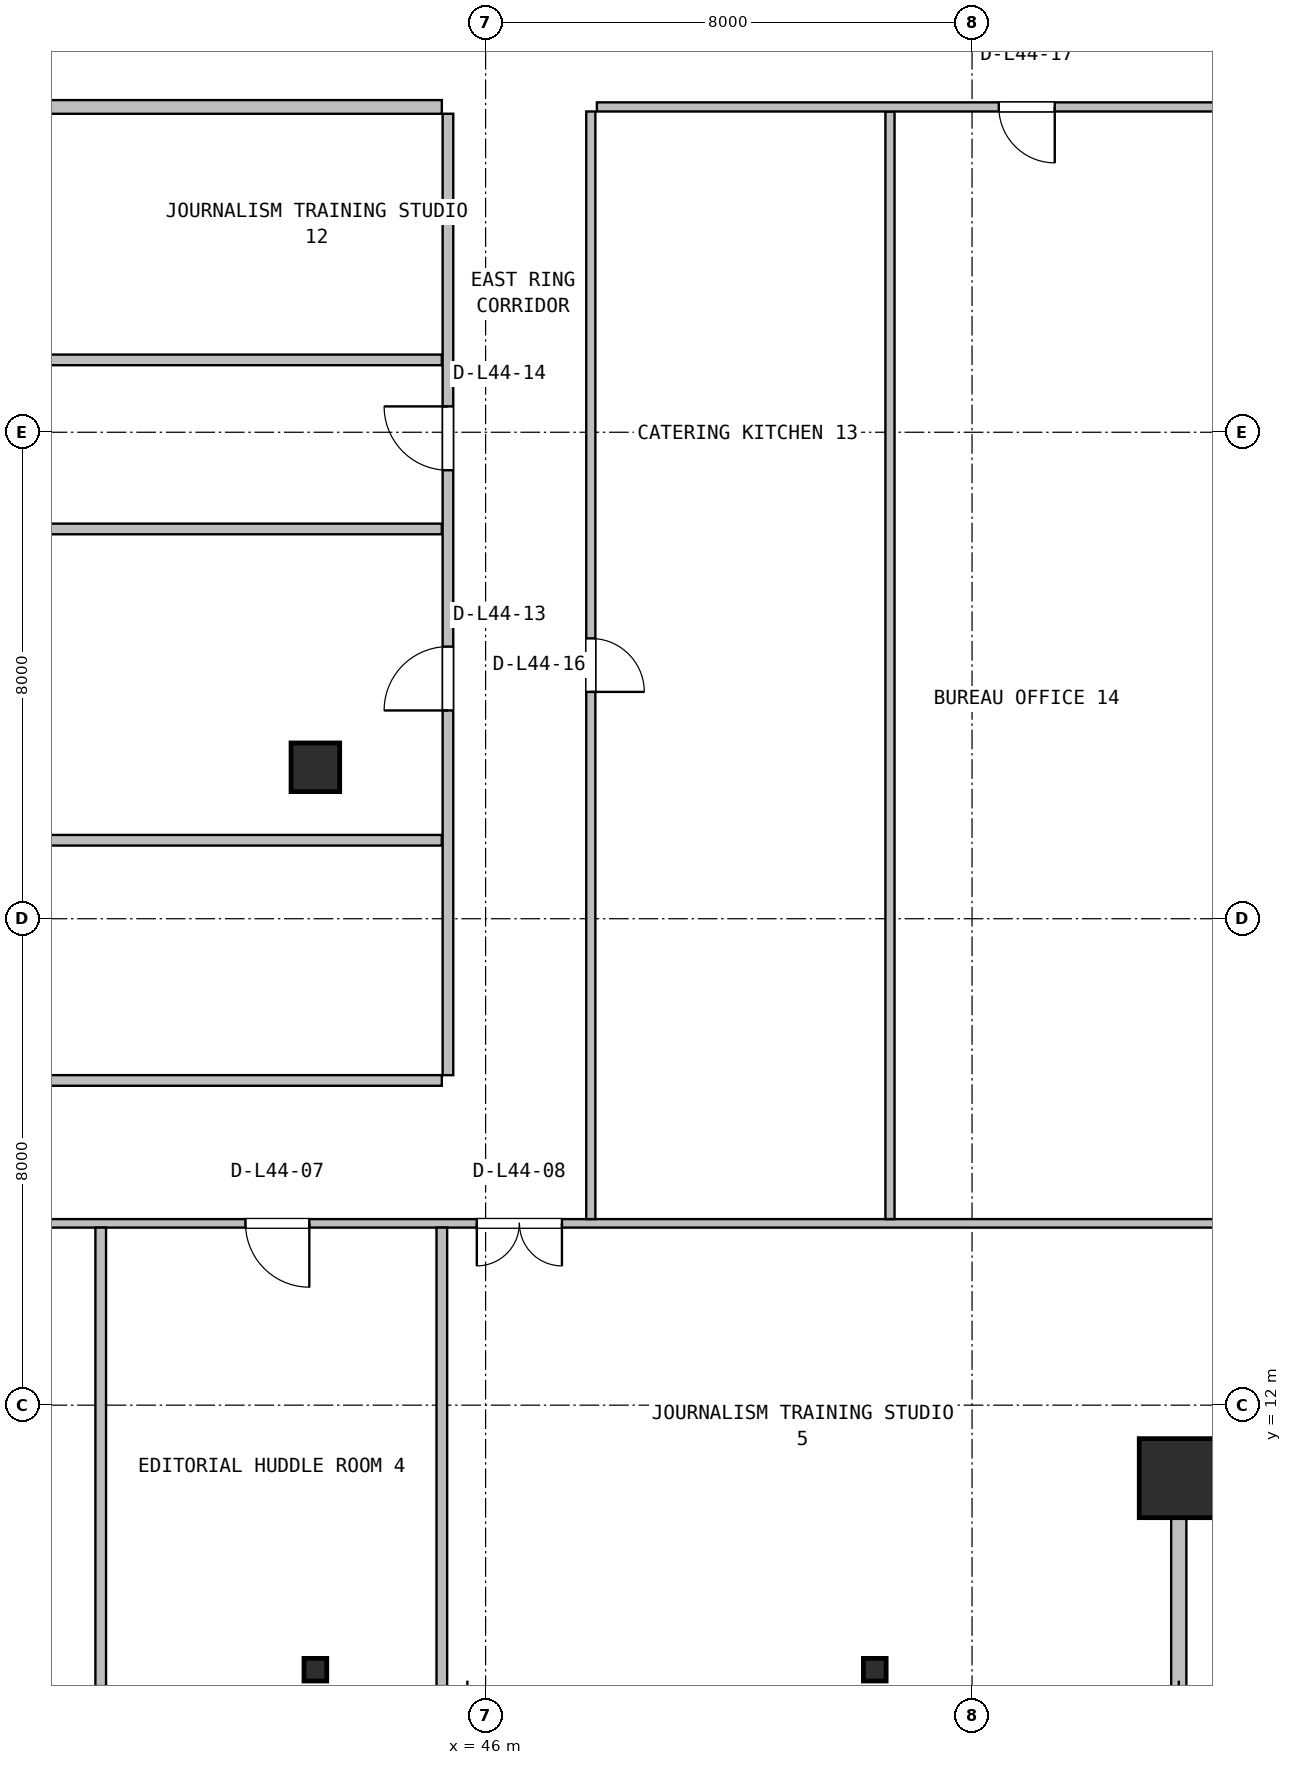
"""IFC4 building model, lengths in metres.
Left out: names, types, materials, properties, quantities, classifications, styles, units other than length and angle.
Written with IfcOpenShell. Run it as: python <this file> out.ifc"""

import sys

from ifc_helpers import new_model, si_unit, direction, frame, frame_2d, origin, origin_2d, place, context, subcontext, project, spatial, rectangle, hollow_rectangle, i_section, extrude, source, transform, mapped, element, fill, save


model = new_model("IFC4")
c1 = context("Model", 3, precision=1e-05, world=origin(), true_north=direction((0.0, 1.0)))
c2 = subcontext(c1, "Body", "Model", "MODEL_VIEW")
j1 = project(units=[si_unit("LENGTHUNIT", "METRE"), si_unit("PLANEANGLEUNIT", "RADIAN")], contexts=[c1])
p1 = place(None, origin())
s1 = spatial("IfcSite", under=j1, at=p1, CompositionType="ELEMENT")
p2 = place(p1, origin())
s2 = spatial("IfcBuilding", under=s1, at=p2, CompositionType="ELEMENT")
p3 = place(p2, frame((0.0, 0.0, 180.0)))
s3 = spatial("IfcBuildingStorey", under=s2, at=p3, CompositionType="ELEMENT", Elevation=180.0)
m1 = source(origin(), c2, "Body", "SweptSolid", [
    extrude(hollow_rectangle(XDim=1.3, YDim=1.3, WallThickness=0.05, at=origin_2d()), origin(), (0.0, 0.0, 1.0), 3.8),
])
p4 = place(p3, frame((57.4, 10.8, 0.0), z_axis=(0.0, 0.0, 1.0), x_axis=(1.0, 0.0, 0.0)))
e1 = element("IfcColumn", 1, at=p4, inside=s3, PredefinedType="COLUMN", context=c2, shape_type="MappedRepresentation", body=[
    mapped(m1, transform((0.0, 0.0, 0.0), x_axis=(1.0, 0.0, 0.0), y_axis=(0.0, 1.0, 0.0), z_axis=(0.0, 0.0, 1.0), scale=1.0)),
])
m2 = source(origin(), c2, "Body", "SweptSolid", [
    extrude(i_section(OverallWidth=0.374, OverallDepth=0.372, WebThickness=0.016, FlangeThickness=0.026, FilletRadius=0.016, at=origin_2d()), origin(), (0.0, 0.0, 1.0), 3.8),
])
for number, where, z_axis, x_axis in (
    (2, (43.2, 7.65, 0.0), (0.0, 0.0, 1.0), (1.0, 0.0, 0.0)),
    (3, (52.4, 7.65, 0.0), (0.0, 0.0, 1.0), (1.0, 0.0, 0.0)),
):
    element("IfcColumn", number, at=place(p3, frame(where, z_axis=z_axis, x_axis=x_axis)), inside=s3, PredefinedType="COLUMN", context=c2, shape_type="MappedRepresentation", body=[
        mapped(m2, transform((0.0, 0.0, 0.0), x_axis=(1.0, 0.0, 0.0), y_axis=(0.0, 1.0, 0.0), z_axis=(0.0, 0.0, 1.0), scale=1.0)),
    ])
m3 = source(origin(), c2, "Body", "SweptSolid", [
    extrude(rectangle(XDim=0.8, YDim=0.8, at=origin_2d()), origin(), (0.0, 0.0, 1.0), 3.8),
])
p5 = place(p3, frame((43.2, 22.49, 0.0), z_axis=(0.0, 0.0, 1.0), x_axis=(1.0, 0.0, 0.0)))
e4 = element("IfcColumn", 4, at=p5, inside=s3, PredefinedType="COLUMN", context=c2, shape_type="MappedRepresentation", body=[
    mapped(m3, transform((0.0, 0.0, 0.0), x_axis=(1.0, 0.0, 0.0), y_axis=(0.0, 1.0, 0.0), z_axis=(0.0, 0.0, 1.0), scale=1.0)),
])
p6 = place(p3, frame((57.4, 7.28, 0.0), z_axis=(0.0, 0.0, 1.0), x_axis=(0.0, 1.0, 0.0)))
e5 = element("IfcWall", 5, at=p6, inside=s3, PredefinedType="SOLIDWALL", context=c2, shape_type="SweptSolid", body=[
    extrude(rectangle(XDim=3.6, YDim=0.25, at=frame_2d((1.8, 0.0))), origin(), (0.0, 0.0, 1.0), 3.108),
])
p7 = place(p3, frame((7.18, 14.99, 0.0), z_axis=(0.0, 0.0, 1.0), x_axis=(1.0, 0.0, 0.0)))
e6 = element("IfcWall", 6, at=p7, inside=s3, PredefinedType="PARTITIONING", context=c2, shape_type="SweptSolid", body=[
    extrude(rectangle(XDim=53.64, YDim=0.14, at=frame_2d((26.82, 0.0))), origin(), (0.0, 0.0, 1.0), 2.909),
])
p8 = place(p7, frame((13.505, 0.0, 0.0)))
e7 = element("IfcOpeningElement", 7, at=p8, cuts=e6, PredefinedType="OPENING", context=c2, shape_type="SweptSolid", body=[
    extrude(rectangle(XDim=1.0, YDim=2.1, at=frame_2d((0.5, 1.05))), frame((0.0, 0.08, 0.0), z_axis=(0.0, -1.0, 0.0), x_axis=(1.0, 0.0, 0.0)), (0.0, 0.0, 1.0), 0.16),
])
p9 = place(p7, frame((18.51, 0.0, 0.0)))
e8 = element("IfcOpeningElement", 8, at=p9, cuts=e6, PredefinedType="OPENING", context=c2, shape_type="SweptSolid", body=[
    extrude(rectangle(XDim=1.05, YDim=2.1, at=frame_2d((0.525, 1.05))), frame((0.0, 0.08, 0.0), z_axis=(0.0, -1.0, 0.0), x_axis=(1.0, 0.0, 0.0)), (0.0, 0.0, 1.0), 0.16),
])
p10 = place(p7, frame((27.215, 0.0, 0.0)))
e9 = element("IfcOpeningElement", 9, at=p10, cuts=e6, PredefinedType="OPENING", context=c2, shape_type="SweptSolid", body=[
    extrude(rectangle(XDim=1.05, YDim=2.1, at=frame_2d((0.525, 1.05))), frame((0.0, 0.08, 0.0), z_axis=(0.0, -1.0, 0.0), x_axis=(1.0, 0.0, 0.0)), (0.0, 0.0, 1.0), 0.16),
])
p11 = place(p7, frame((34.87, 0.0, 0.0)))
e10 = element("IfcOpeningElement", 10, at=p11, cuts=e6, PredefinedType="OPENING", context=c2, shape_type="SweptSolid", body=[
    extrude(rectangle(XDim=1.05, YDim=2.1, at=frame_2d((0.525, 1.05))), frame((0.0, 0.08, 0.0), z_axis=(0.0, -1.0, 0.0), x_axis=(1.0, 0.0, 0.0)), (0.0, 0.0, 1.0), 0.16),
])
p12 = place(p7, frame((38.675, 0.0, 0.0)))
e11 = element("IfcOpeningElement", 11, at=p12, cuts=e6, PredefinedType="OPENING", context=c2, shape_type="SweptSolid", body=[
    extrude(rectangle(XDim=1.4, YDim=2.12, at=frame_2d((0.7, 1.06))), frame((0.0, 0.08, 0.0), z_axis=(0.0, -1.0, 0.0), x_axis=(1.0, 0.0, 0.0)), (0.0, 0.0, 1.0), 0.16),
])
for number, where, z_axis, x_axis in (
    (12, (39.67, 7.38, 0.0), (0.0, 0.0, 1.0), (0.0, 1.0, 0.0)),
    (13, (45.28, 7.38, 0.0), (0.0, 0.0, 1.0), (0.0, 1.0, 0.0)),
):
    element("IfcWall", number, at=place(p3, frame(where, z_axis=z_axis, x_axis=x_axis)), inside=s3, PredefinedType="PARTITIONING", context=c2, shape_type="SweptSolid", body=[
        extrude(rectangle(XDim=7.54, YDim=0.175, at=frame_2d((3.77, 0.0))), origin(), (0.0, 0.0, 1.0), 3.108),
    ])
p13 = place(p3, frame((22.46, 17.34, 0.0), z_axis=(0.0, 0.0, 1.0), x_axis=(1.0, 0.0, 0.0)))
e14 = element("IfcWall", 14, at=p13, inside=s3, PredefinedType="PARTITIONING", context=c2, shape_type="SweptSolid", body=[
    extrude(rectangle(XDim=22.82, YDim=0.175, at=frame_2d((11.41, 0.0))), origin(), (0.0, 0.0, 1.0), 2.909),
])
p14 = place(p13, frame((10.885, 0.0, 0.0)))
e15 = element("IfcOpeningElement", 15, at=p14, cuts=e14, PredefinedType="OPENING", context=c2, shape_type="SweptSolid", body=[
    extrude(rectangle(XDim=1.05, YDim=2.1, at=frame_2d((0.525, 1.05))), frame((0.0, 0.098, 0.0), z_axis=(0.0, -1.0, 0.0), x_axis=(1.0, 0.0, 0.0)), (0.0, 0.0, 1.0), 0.195),
])
p15 = place(p3, frame((45.38, 17.427, 0.0), z_axis=(0.0, 0.0, 1.0), x_axis=(0.0, 1.0, 0.0)))
e16 = element("IfcWall", 16, at=p15, inside=s3, PredefinedType="PARTITIONING", context=c2, shape_type="SweptSolid", body=[
    extrude(rectangle(XDim=15.811, YDim=0.175, at=frame_2d((7.906, 0.0))), origin(), (0.0, 0.0, 1.0), 3.222),
])
p16 = place(p15, frame((5.998, 0.0, 0.0)))
e17 = element("IfcOpeningElement", 17, at=p16, cuts=e16, PredefinedType="OPENING", context=c2, shape_type="SweptSolid", body=[
    extrude(rectangle(XDim=1.05, YDim=2.1, at=frame_2d((0.525, 1.05))), frame((0.0, 0.098, 0.0), z_axis=(0.0, -1.0, 0.0), x_axis=(1.0, 0.0, 0.0)), (0.0, 0.0, 1.0), 0.195),
])
p17 = place(p15, frame((9.948, 0.0, 0.0)))
e18 = element("IfcOpeningElement", 18, at=p17, cuts=e16, PredefinedType="OPENING", context=c2, shape_type="SweptSolid", body=[
    extrude(rectangle(XDim=1.05, YDim=2.1, at=frame_2d((0.525, 1.05))), frame((0.0, 0.098, 0.0), z_axis=(0.0, -1.0, 0.0), x_axis=(1.0, 0.0, 0.0)), (0.0, 0.0, 1.0), 0.195),
])
for number, where, z_axis, x_axis in (
    (19, (22.46, 21.29, 0.0), (0.0, 0.0, 1.0), (1.0, 0.0, 0.0)),
    (20, (22.46, 26.41, 0.0), (0.0, 0.0, 1.0), (1.0, 0.0, 0.0)),
    (21, (22.46, 29.19, 0.0), (0.0, 0.0, 1.0), (1.0, 0.0, 0.0)),
):
    element("IfcWall", number, at=place(p3, frame(where, z_axis=z_axis, x_axis=x_axis)), inside=s3, PredefinedType="PARTITIONING", context=c2, shape_type="SweptSolid", body=[
        extrude(rectangle(XDim=22.82, YDim=0.175, at=frame_2d((11.41, 0.0))), origin(), (0.0, 0.0, 1.0), 2.909),
    ])
p18 = place(p3, frame((22.46, 33.35, 0.0), z_axis=(0.0, 0.0, 1.0), x_axis=(1.0, 0.0, 0.0)))
e22 = element("IfcWall", 22, at=p18, inside=s3, PredefinedType="PARTITIONING", context=c2, shape_type="SweptSolid", body=[
    extrude(rectangle(XDim=22.82, YDim=0.225, at=frame_2d((11.41, 0.0))), origin(), (0.0, 0.0, 1.0), 2.909),
])
p19 = place(p18, frame((10.71, 0.0, 0.0)))
e23 = element("IfcOpeningElement", 23, at=p19, cuts=e22, PredefinedType="OPENING", context=c2, shape_type="SweptSolid", body=[
    extrude(rectangle(XDim=1.4, YDim=2.12, at=frame_2d((0.7, 1.06))), frame((0.0, 0.123, 0.0), z_axis=(0.0, -1.0, 0.0), x_axis=(1.0, 0.0, 0.0)), (0.0, 0.0, 1.0), 0.245),
])
p20 = place(p3, frame((52.65, 15.06, 0.0), z_axis=(0.0, 0.0, 1.0), x_axis=(0.0, 1.0, 0.0)))
e24 = element("IfcWall", 24, at=p20, inside=s3, PredefinedType="PARTITIONING", context=c2, shape_type="SweptSolid", body=[
    extrude(rectangle(XDim=18.215, YDim=0.15, at=frame_2d((9.107, 0.0))), origin(), (0.0, 0.0, 1.0), 3.222),
])
p21 = place(p3, frame((47.83, 33.35, 0.0), z_axis=(0.0, 0.0, 1.0), x_axis=(1.0, 0.0, 0.0)))
e25 = element("IfcWall", 25, at=p21, inside=s3, PredefinedType="PARTITIONING", context=c2, shape_type="SweptSolid", body=[
    extrude(rectangle(XDim=12.99, YDim=0.15, at=frame_2d((6.495, 0.0))), origin(), (0.0, 0.0, 1.0), 3.108),
])
p22 = place(p21, frame((6.61, 0.0, 0.0)))
e26 = element("IfcOpeningElement", 26, at=p22, cuts=e25, PredefinedType="OPENING", context=c2, shape_type="SweptSolid", body=[
    extrude(rectangle(XDim=0.92, YDim=2.08, at=frame_2d((0.46, 1.04))), frame((0.0, 0.085, 0.0), z_axis=(0.0, -1.0, 0.0), x_axis=(1.0, 0.0, 0.0)), (0.0, 0.0, 1.0), 0.17),
])
p23 = place(p3, frame((47.73, 15.06, 0.0), z_axis=(0.0, 0.0, 1.0), x_axis=(0.0, 1.0, 0.0)))
e27 = element("IfcWall", 27, at=p23, inside=s3, PredefinedType="PARTITIONING", context=c2, shape_type="SweptSolid", body=[
    extrude(rectangle(XDim=18.215, YDim=0.15, at=frame_2d((9.107, 0.0))), origin(), (0.0, 0.0, 1.0), 3.222),
])
p24 = place(p23, frame((8.67, 0.0, 0.0)))
e28 = element("IfcOpeningElement", 28, at=p24, cuts=e27, PredefinedType="OPENING", context=c2, shape_type="SweptSolid", body=[
    extrude(rectangle(XDim=0.88, YDim=2.06, at=frame_2d((0.44, 1.03))), frame((0.0, 0.085, 0.0), z_axis=(0.0, -1.0, 0.0), x_axis=(1.0, 0.0, 0.0)), (0.0, 0.0, 1.0), 0.17),
])
m4 = source(origin(), c2, "Body", "SweptSolid", [
    extrude(rectangle(XDim=1.05, YDim=2.1, at=frame_2d((0.525, 1.05))), frame((0.0, 0.025, 0.0), z_axis=(0.0, -1.0, 0.0), x_axis=(1.0, 0.0, 0.0)), (0.0, 0.0, 1.0), 0.05),
])
p25 = place(p11, frame((1.05, 0.0, 0.0), z_axis=(0.0, 0.0, 1.0), x_axis=(-1.0, 0.0, 0.0)))
e29 = element("IfcDoor", 29, at=p25, inside=s3, OperationType="SINGLE_SWING_RIGHT", PredefinedType="DOOR", context=c2, shape_type="MappedRepresentation", body=[
    mapped(m4, transform((0.0, 0.0, 0.0), x_axis=(1.0, 0.0, 0.0), y_axis=(0.0, 1.0, 0.0), z_axis=(0.0, 0.0, 1.0), scale=1.0)),
])
fill(e10, e29)
m5 = source(origin(), c2, "Body", "SweptSolid", [
    extrude(rectangle(XDim=1.4, YDim=2.12, at=frame_2d((0.7, 1.06))), frame((0.0, 0.025, 0.0), z_axis=(0.0, -1.0, 0.0), x_axis=(1.0, 0.0, 0.0)), (0.0, 0.0, 1.0), 0.05),
])
p26 = place(p12, frame((1.4, 0.0, 0.0), z_axis=(0.0, 0.0, 1.0), x_axis=(-1.0, 0.0, 0.0)))
e30 = element("IfcDoor", 30, at=p26, inside=s3, OperationType="DOUBLE_DOOR_SINGLE_SWING", PredefinedType="DOOR", context=c2, shape_type="MappedRepresentation", body=[
    mapped(m5, transform((0.0, 0.0, 0.0), x_axis=(1.0, 0.0, 0.0), y_axis=(0.0, 1.0, 0.0), z_axis=(0.0, 0.0, 1.0), scale=1.0)),
])
fill(e11, e30)
p27 = place(p16, origin())
e31 = element("IfcDoor", 31, at=p27, inside=s3, OperationType="SINGLE_SWING_LEFT", PredefinedType="DOOR", context=c2, shape_type="MappedRepresentation", body=[
    mapped(m4, transform((0.0, 0.0, 0.0), x_axis=(1.0, 0.0, 0.0), y_axis=(0.0, 1.0, 0.0), z_axis=(0.0, 0.0, 1.0), scale=1.0)),
])
fill(e17, e31)
p28 = place(p17, origin())
e32 = element("IfcDoor", 32, at=p28, inside=s3, OperationType="SINGLE_SWING_RIGHT", PredefinedType="DOOR", context=c2, shape_type="MappedRepresentation", body=[
    mapped(m4, transform((0.0, 0.0, 0.0), x_axis=(1.0, 0.0, 0.0), y_axis=(0.0, 1.0, 0.0), z_axis=(0.0, 0.0, 1.0), scale=1.0)),
])
fill(e18, e32)
m6 = source(origin(), c2, "Body", "SweptSolid", [
    extrude(rectangle(XDim=0.88, YDim=2.06, at=frame_2d((0.44, 1.03))), frame((0.0, 0.025, 0.0), z_axis=(0.0, -1.0, 0.0), x_axis=(1.0, 0.0, 0.0)), (0.0, 0.0, 1.0), 0.05),
])
p29 = place(p24, frame((0.88, 0.0, 0.0), z_axis=(0.0, 0.0, 1.0), x_axis=(-1.0, 0.0, 0.0)))
e33 = element("IfcDoor", 33, at=p29, inside=s3, OperationType="SINGLE_SWING_LEFT", PredefinedType="DOOR", context=c2, shape_type="MappedRepresentation", body=[
    mapped(m6, transform((0.0, 0.0, 0.0), x_axis=(1.0, 0.0, 0.0), y_axis=(0.0, 1.0, 0.0), z_axis=(0.0, 0.0, 1.0), scale=1.0)),
])
fill(e28, e33)
m7 = source(origin(), c2, "Body", "SweptSolid", [
    extrude(rectangle(XDim=0.92, YDim=2.08, at=frame_2d((0.46, 1.04))), frame((0.0, 0.025, 0.0), z_axis=(0.0, -1.0, 0.0), x_axis=(1.0, 0.0, 0.0)), (0.0, 0.0, 1.0), 0.05),
])
p30 = place(p22, frame((0.92, 0.0, 0.0), z_axis=(0.0, 0.0, 1.0), x_axis=(-1.0, 0.0, 0.0)))
e34 = element("IfcDoor", 34, at=p30, inside=s3, OperationType="SINGLE_SWING_RIGHT", PredefinedType="DOOR", context=c2, shape_type="MappedRepresentation", body=[
    mapped(m7, transform((0.0, 0.0, 0.0), x_axis=(1.0, 0.0, 0.0), y_axis=(0.0, 1.0, 0.0), z_axis=(0.0, 0.0, 1.0), scale=1.0)),
])
fill(e26, e34)
save(model, sys.argv[1])
